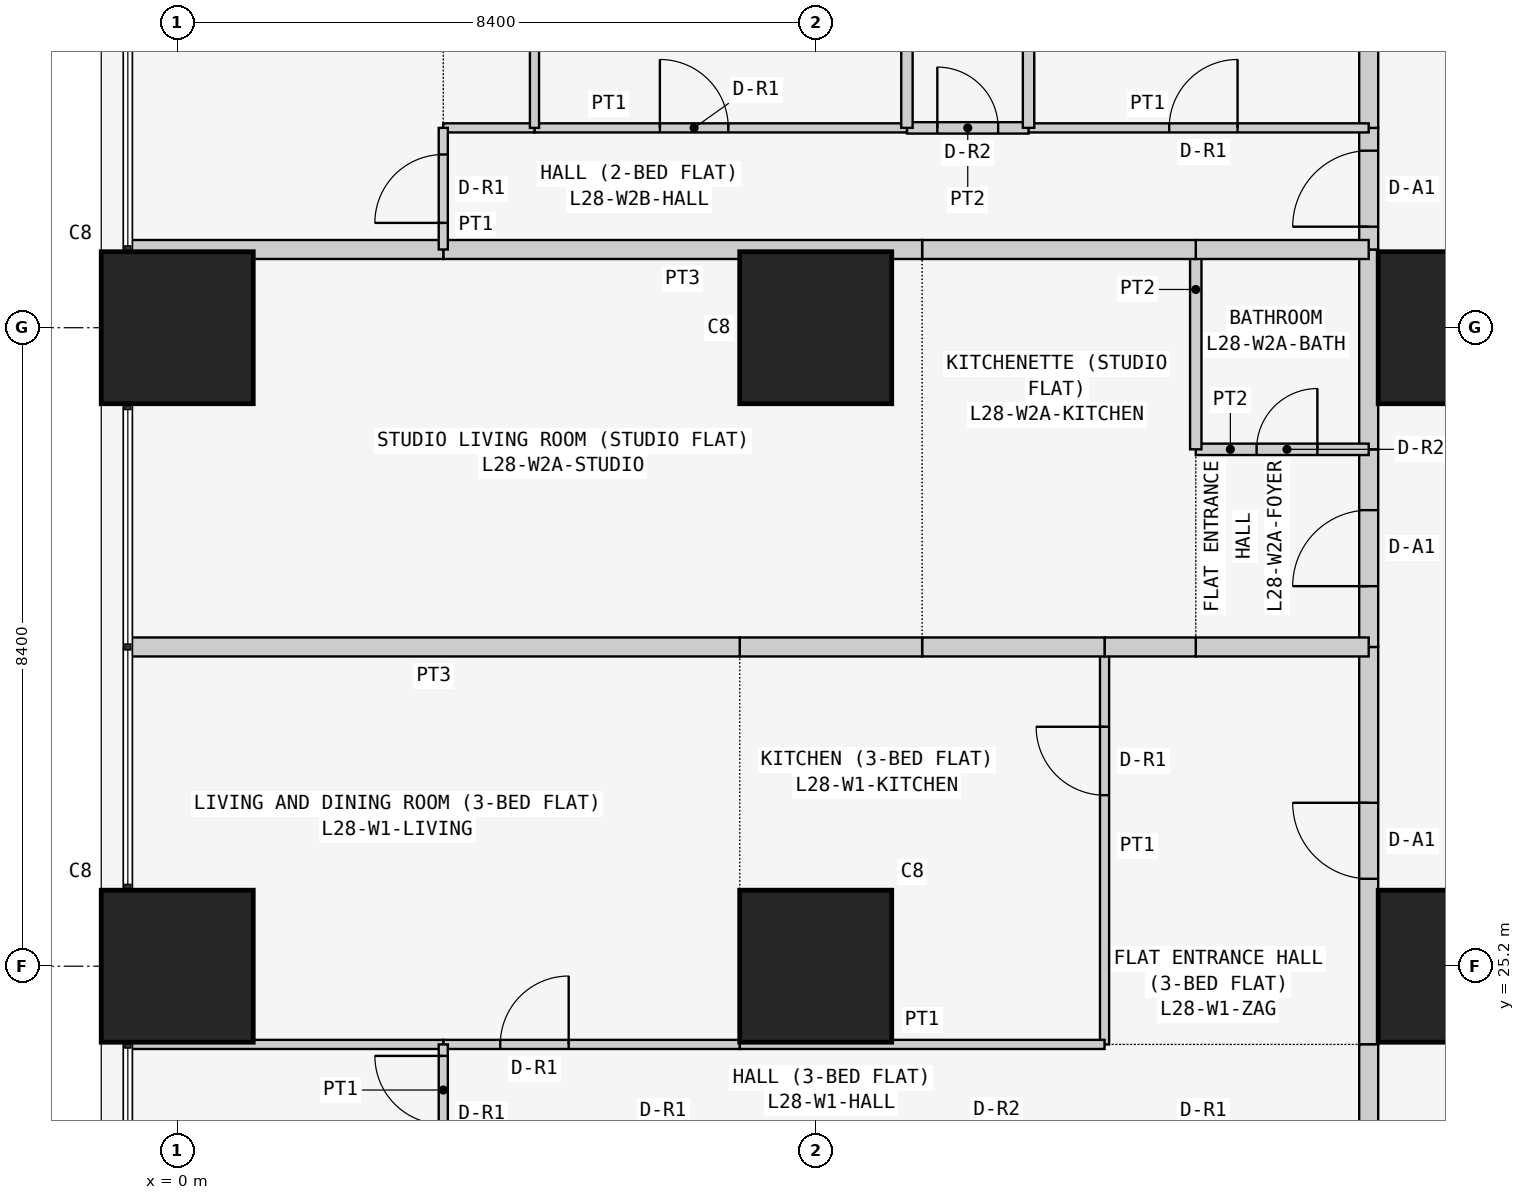
"""IFC4 building model, lengths in metres.
Left out: names, types, materials, properties, quantities, classifications, styles, units other than length and angle.
Written with IfcOpenShell. Run it as: python <this file> out.ifc"""

import sys

from ifc_helpers import new_model, si_unit, direction, frame, frame_2d, origin, origin_2d, place, context, subcontext, project, spatial, rectangle, extrude, element, fill, save


model = new_model("IFC4")
c1 = context("Model", 3, precision=1e-05, world=origin(), true_north=direction((0.0, 1.0)))
c2 = subcontext(c1, "Body", "Model", "MODEL_VIEW")
j1 = project(units=[si_unit("LENGTHUNIT", "METRE"), si_unit("PLANEANGLEUNIT", "RADIAN")], contexts=[c1])
p1 = place(None, origin())
s1 = spatial("IfcSite", under=j1, at=p1, CompositionType="ELEMENT")
p2 = place(p1, origin())
s2 = spatial("IfcBuilding", under=s1, at=p2, CompositionType="ELEMENT")
p3 = place(p2, frame((0.0, 0.0, 112.5)))
s3 = spatial("IfcBuildingStorey", under=s2, at=p3, CompositionType="ELEMENT", Elevation=112.5)
for number, where, z_axis, x_axis in (
    (1, (0.0, 25.2, 0.0), (0.0, 0.0, 1.0), (1.0, 0.0, 0.0)),
    (2, (0.0, 33.6, 0.0), (0.0, 0.0, 1.0), (1.0, 0.0, 0.0)),
    (3, (8.4, 25.2, 0.0), (0.0, 0.0, 1.0), (1.0, 0.0, 0.0)),
    (4, (8.4, 33.6, 0.0), (0.0, 0.0, 1.0), (1.0, 0.0, 0.0)),
    (5, (16.8, 25.2, 0.0), (0.0, 0.0, 1.0), (1.0, 0.0, 0.0)),
    (6, (16.8, 33.6, 0.0), (0.0, 0.0, 1.0), (1.0, 0.0, 0.0)),
):
    element("IfcColumn", number, at=place(p3, frame(where, z_axis=z_axis, x_axis=x_axis)), inside=s3, PredefinedType="COLUMN", context=c2, shape_type="SweptSolid", body=[
        extrude(rectangle(XDim=2.0, YDim=2.0, at=origin_2d()), origin(), (0.0, 0.0, 1.0), 3.6),
    ])
p4 = place(p3, frame((15.675, 24.171, 0.0), z_axis=(0.0, 0.0, 1.0), x_axis=(0.0, 1.0, 0.0)))
e7 = element("IfcWall", 7, at=p4, inside=s3, PredefinedType="PARTITIONING", context=c2, shape_type="SweptSolid", body=[
    extrude(rectangle(XDim=5.229, YDim=0.25, at=frame_2d((2.615, 0.0))), origin(), (0.0, 0.0, 1.0), 3.45),
])
p5 = place(p4, frame((2.179, 0.0, 0.0)))
e8 = element("IfcOpeningElement", 8, at=p5, cuts=e7, PredefinedType="OPENING", context=c2, shape_type="SweptSolid", body=[
    extrude(rectangle(XDim=1.0, YDim=2.1, at=frame_2d((0.5, 1.05))), frame((0.0, 0.135, 0.0), z_axis=(0.0, -1.0, 0.0), x_axis=(1.0, 0.0, 0.0)), (0.0, 0.0, 1.0), 0.27),
])
p6 = place(p3, frame((15.675, 22.971, 0.0), z_axis=(0.0, 0.0, 1.0), x_axis=(0.0, 1.0, 0.0)))
e9 = element("IfcWall", 9, at=p6, inside=s3, PredefinedType="PARTITIONING", context=c2, shape_type="SweptSolid", body=[
    extrude(rectangle(XDim=1.2, YDim=0.25, at=frame_2d((0.6, 0.0))), origin(), (0.0, 0.0, 1.0), 3.45),
])
p7 = place(p3, frame((15.675, 29.4, 0.0), z_axis=(0.0, 0.0, 1.0), x_axis=(0.0, 1.0, 0.0)))
e10 = element("IfcWall", 10, at=p7, inside=s3, PredefinedType="PARTITIONING", context=c2, shape_type="SweptSolid", body=[
    extrude(rectangle(XDim=2.6, YDim=0.25, at=frame_2d((1.3, 0.0))), origin(), (0.0, 0.0, 1.0), 3.45),
])
p8 = place(p7, frame((0.8, 0.0, 0.0)))
e11 = element("IfcOpeningElement", 11, at=p8, cuts=e10, PredefinedType="OPENING", context=c2, shape_type="SweptSolid", body=[
    extrude(rectangle(XDim=1.0, YDim=2.1, at=frame_2d((0.5, 1.05))), frame((0.0, 0.135, 0.0), z_axis=(0.0, -1.0, 0.0), x_axis=(1.0, 0.0, 0.0)), (0.0, 0.0, 1.0), 0.27),
])
p9 = place(p3, frame((15.675, 32.0, 0.0), z_axis=(0.0, 0.0, 1.0), x_axis=(0.0, 1.0, 0.0)))
e12 = element("IfcWall", 12, at=p9, inside=s3, PredefinedType="PARTITIONING", context=c2, shape_type="SweptSolid", body=[
    extrude(rectangle(XDim=2.629, YDim=0.25, at=frame_2d((1.314, 0.0))), origin(), (0.0, 0.0, 1.0), 3.45),
])
p10 = place(p3, frame((15.675, 34.629, 0.0), z_axis=(0.0, 0.0, 1.0), x_axis=(0.0, 1.0, 0.0)))
e13 = element("IfcWall", 13, at=p10, inside=s3, PredefinedType="PARTITIONING", context=c2, shape_type="SweptSolid", body=[
    extrude(rectangle(XDim=1.6, YDim=0.25, at=frame_2d((0.8, 0.0))), origin(), (0.0, 0.0, 1.0), 3.45),
])
p11 = place(p10, frame((0.3, 0.0, 0.0)))
e14 = element("IfcOpeningElement", 14, at=p11, cuts=e13, PredefinedType="OPENING", context=c2, shape_type="SweptSolid", body=[
    extrude(rectangle(XDim=1.0, YDim=2.1, at=frame_2d((0.5, 1.05))), frame((0.0, 0.135, 0.0), z_axis=(0.0, -1.0, 0.0), x_axis=(1.0, 0.0, 0.0)), (0.0, 0.0, 1.0), 0.27),
])
p12 = place(p3, frame((15.675, 36.229, 0.0), z_axis=(0.0, 0.0, 1.0), x_axis=(0.0, 1.0, 0.0)))
e15 = element("IfcWall", 15, at=p12, inside=s3, PredefinedType="PARTITIONING", context=c2, shape_type="SweptSolid", body=[
    extrude(rectangle(XDim=6.471, YDim=0.25, at=frame_2d((3.235, 0.0))), origin(), (0.0, 0.0, 1.0), 3.45),
])
p13 = place(p3, frame((12.2, 29.4, 0.0), z_axis=(0.0, 0.0, 1.0), x_axis=(0.0, -1.0, 0.0)))
e16 = element("IfcWall", 16, at=p13, inside=s3, PredefinedType="PARTITIONING", context=c2, shape_type="SweptSolid", body=[
    extrude(rectangle(XDim=5.229, YDim=0.12, at=frame_2d((2.615, 0.0))), origin(), (0.0, 0.0, 1.0), 3.45),
])
p14 = place(p13, frame((1.05, 0.0, 0.0)))
e17 = element("IfcOpeningElement", 17, at=p14, cuts=e16, PredefinedType="OPENING", context=c2, shape_type="SweptSolid", body=[
    extrude(rectangle(XDim=0.9, YDim=2.1, at=frame_2d((0.45, 1.05))), frame((0.0, 0.07, 0.0), z_axis=(0.0, -1.0, 0.0), x_axis=(1.0, 0.0, 0.0)), (0.0, 0.0, 1.0), 0.14),
])
p15 = place(p3, frame((15.675, 29.4, 0.0), z_axis=(0.0, 0.0, 1.0), x_axis=(-1.0, 0.0, 0.0)))
e18 = element("IfcWall", 18, at=p15, inside=s3, PredefinedType="PARTITIONING", context=c2, shape_type="SweptSolid", body=[
    extrude(rectangle(XDim=2.275, YDim=0.25, at=frame_2d((1.138, 0.0))), origin(), (0.0, 0.0, 1.0), 3.45),
])
p16 = place(p3, frame((13.4, 29.4, 0.0), z_axis=(0.0, 0.0, 1.0), x_axis=(-1.0, 0.0, 0.0)))
e19 = element("IfcWall", 19, at=p16, inside=s3, PredefinedType="PARTITIONING", context=c2, shape_type="SweptSolid", body=[
    extrude(rectangle(XDim=1.2, YDim=0.25, at=frame_2d((0.6, 0.0))), origin(), (0.0, 0.0, 1.0), 3.45),
])
p17 = place(p3, frame((7.4, 24.171, 0.0), z_axis=(0.0, 0.0, 1.0), x_axis=(1.0, 0.0, 0.0)))
e20 = element("IfcWall", 20, at=p17, inside=s3, PredefinedType="PARTITIONING", context=c2, shape_type="SweptSolid", body=[
    extrude(rectangle(XDim=4.8, YDim=0.12, at=frame_2d((2.4, 0.0))), origin(), (0.0, 0.0, 1.0), 3.45),
])
p18 = place(p3, frame((12.2, 29.4, 0.0), z_axis=(0.0, 0.0, 1.0), x_axis=(-1.0, 0.0, 0.0)))
e21 = element("IfcWall", 21, at=p18, inside=s3, PredefinedType="PARTITIONING", context=c2, shape_type="SweptSolid", body=[
    extrude(rectangle(XDim=2.4, YDim=0.25, at=frame_2d((1.2, 0.0))), origin(), (0.0, 0.0, 1.0), 3.45),
])
p19 = place(p3, frame((9.8, 29.4, 0.0), z_axis=(0.0, 0.0, 1.0), x_axis=(-1.0, 0.0, 0.0)))
e22 = element("IfcWall", 22, at=p19, inside=s3, PredefinedType="PARTITIONING", context=c2, shape_type="SweptSolid", body=[
    extrude(rectangle(XDim=2.4, YDim=0.25, at=frame_2d((1.2, 0.0))), origin(), (0.0, 0.0, 1.0), 3.45),
])
p20 = place(p3, frame((3.5, 24.171, 0.0), z_axis=(0.0, 0.0, 1.0), x_axis=(1.0, 0.0, 0.0)))
e23 = element("IfcWall", 23, at=p20, inside=s3, PredefinedType="PARTITIONING", context=c2, shape_type="SweptSolid", body=[
    extrude(rectangle(XDim=3.9, YDim=0.12, at=frame_2d((1.95, 0.0))), origin(), (0.0, 0.0, 1.0), 3.45),
])
p21 = place(p20, frame((0.75, 0.0, 0.0)))
e24 = element("IfcOpeningElement", 24, at=p21, cuts=e23, PredefinedType="OPENING", context=c2, shape_type="SweptSolid", body=[
    extrude(rectangle(XDim=0.9, YDim=2.1, at=frame_2d((0.45, 1.05))), frame((0.0, 0.07, 0.0), z_axis=(0.0, -1.0, 0.0), x_axis=(1.0, 0.0, 0.0)), (0.0, 0.0, 1.0), 0.14),
])
p22 = place(p3, frame((-0.65, 24.171, 0.0), z_axis=(0.0, 0.0, 1.0), x_axis=(1.0, 0.0, 0.0)))
e25 = element("IfcWall", 25, at=p22, inside=s3, PredefinedType="PARTITIONING", context=c2, shape_type="SweptSolid", body=[
    extrude(rectangle(XDim=4.15, YDim=0.12, at=frame_2d((2.075, 0.0))), origin(), (0.0, 0.0, 1.0), 3.45),
])
p23 = place(p3, frame((7.4, 29.4, 0.0), z_axis=(0.0, 0.0, 1.0), x_axis=(-1.0, 0.0, 0.0)))
e26 = element("IfcWall", 26, at=p23, inside=s3, PredefinedType="PARTITIONING", context=c2, shape_type="SweptSolid", body=[
    extrude(rectangle(XDim=8.05, YDim=0.25, at=frame_2d((4.025, 0.0))), origin(), (0.0, 0.0, 1.0), 3.45),
])
p24 = place(p3, frame((3.5, 24.171, 0.0), z_axis=(0.0, 0.0, 1.0), x_axis=(0.0, -1.0, 0.0)))
e27 = element("IfcWall", 27, at=p24, inside=s3, PredefinedType="PARTITIONING", context=c2, shape_type="SweptSolid", body=[
    extrude(rectangle(XDim=1.2, YDim=0.12, at=frame_2d((0.6, 0.0))), origin(), (0.0, 0.0, 1.0), 3.45),
])
p25 = place(p24, frame((0.151, 0.0, 0.0)))
e28 = element("IfcOpeningElement", 28, at=p25, cuts=e27, PredefinedType="OPENING", context=c2, shape_type="SweptSolid", body=[
    extrude(rectangle(XDim=0.9, YDim=2.1, at=frame_2d((0.45, 1.05))), frame((0.0, 0.07, 0.0), z_axis=(0.0, -1.0, 0.0), x_axis=(1.0, 0.0, 0.0)), (0.0, 0.0, 1.0), 0.14),
])
p26 = place(p3, frame((13.4, 32.0, 0.0), z_axis=(0.0, 0.0, 1.0), x_axis=(1.0, 0.0, 0.0)))
e29 = element("IfcWall", 29, at=p26, inside=s3, PredefinedType="PARTITIONING", context=c2, shape_type="SweptSolid", body=[
    extrude(rectangle(XDim=2.275, YDim=0.15, at=frame_2d((1.138, 0.0))), origin(), (0.0, 0.0, 1.0), 3.45),
])
p27 = place(p26, frame((0.8, 0.0, 0.0)))
e30 = element("IfcOpeningElement", 30, at=p27, cuts=e29, PredefinedType="OPENING", context=c2, shape_type="SweptSolid", body=[
    extrude(rectangle(XDim=0.8, YDim=2.1, at=frame_2d((0.4, 1.05))), frame((0.0, 0.085, 0.0), z_axis=(0.0, -1.0, 0.0), x_axis=(1.0, 0.0, 0.0)), (0.0, 0.0, 1.0), 0.17),
])
p28 = place(p3, frame((13.4, 32.0, 0.0), z_axis=(0.0, 0.0, 1.0), x_axis=(0.0, 1.0, 0.0)))
e31 = element("IfcWall", 31, at=p28, inside=s3, PredefinedType="PARTITIONING", context=c2, shape_type="SweptSolid", body=[
    extrude(rectangle(XDim=2.629, YDim=0.15, at=frame_2d((1.314, 0.0))), origin(), (0.0, 0.0, 1.0), 3.45),
])
p29 = place(p3, frame((13.4, 34.629, 0.0), z_axis=(0.0, 0.0, 1.0), x_axis=(1.0, 0.0, 0.0)))
e32 = element("IfcWall", 32, at=p29, inside=s3, PredefinedType="PARTITIONING", context=c2, shape_type="SweptSolid", body=[
    extrude(rectangle(XDim=2.275, YDim=0.25, at=frame_2d((1.138, 0.0))), origin(), (0.0, 0.0, 1.0), 3.45),
])
p30 = place(p3, frame((9.8, 34.629, 0.0), z_axis=(0.0, 0.0, 1.0), x_axis=(1.0, 0.0, 0.0)))
e33 = element("IfcWall", 33, at=p30, inside=s3, PredefinedType="PARTITIONING", context=c2, shape_type="SweptSolid", body=[
    extrude(rectangle(XDim=3.6, YDim=0.25, at=frame_2d((1.8, 0.0))), origin(), (0.0, 0.0, 1.0), 3.45),
])
p31 = place(p3, frame((3.5, 34.629, 0.0), z_axis=(0.0, 0.0, 1.0), x_axis=(1.0, 0.0, 0.0)))
e34 = element("IfcWall", 34, at=p31, inside=s3, PredefinedType="PARTITIONING", context=c2, shape_type="SweptSolid", body=[
    extrude(rectangle(XDim=6.3, YDim=0.25, at=frame_2d((3.15, 0.0))), origin(), (0.0, 0.0, 1.0), 3.45),
])
p32 = place(p3, frame((-0.65, 34.629, 0.0), z_axis=(0.0, 0.0, 1.0), x_axis=(1.0, 0.0, 0.0)))
e35 = element("IfcWall", 35, at=p32, inside=s3, PredefinedType="PARTITIONING", context=c2, shape_type="SweptSolid", body=[
    extrude(rectangle(XDim=4.15, YDim=0.25, at=frame_2d((2.075, 0.0))), origin(), (0.0, 0.0, 1.0), 3.45),
])
p33 = place(p3, frame((11.2, 36.229, 0.0), z_axis=(0.0, 0.0, 1.0), x_axis=(1.0, 0.0, 0.0)))
e36 = element("IfcWall", 36, at=p33, inside=s3, PredefinedType="PARTITIONING", context=c2, shape_type="SweptSolid", body=[
    extrude(rectangle(XDim=4.475, YDim=0.12, at=frame_2d((2.238, 0.0))), origin(), (0.0, 0.0, 1.0), 3.45),
])
p34 = place(p33, frame((1.85, 0.0, 0.0)))
e37 = element("IfcOpeningElement", 37, at=p34, cuts=e36, PredefinedType="OPENING", context=c2, shape_type="SweptSolid", body=[
    extrude(rectangle(XDim=0.9, YDim=2.1, at=frame_2d((0.45, 1.05))), frame((0.0, 0.07, 0.0), z_axis=(0.0, -1.0, 0.0), x_axis=(1.0, 0.0, 0.0)), (0.0, 0.0, 1.0), 0.14),
])
p35 = place(p3, frame((9.6, 36.229, 0.0), z_axis=(0.0, 0.0, 1.0), x_axis=(1.0, 0.0, 0.0)))
e38 = element("IfcWall", 38, at=p35, inside=s3, PredefinedType="PARTITIONING", context=c2, shape_type="SweptSolid", body=[
    extrude(rectangle(XDim=1.6, YDim=0.15, at=frame_2d((0.8, 0.0))), origin(), (0.0, 0.0, 1.0), 3.45),
])
p36 = place(p35, frame((0.4, 0.0, 0.0)))
e39 = element("IfcOpeningElement", 39, at=p36, cuts=e38, PredefinedType="OPENING", context=c2, shape_type="SweptSolid", body=[
    extrude(rectangle(XDim=0.8, YDim=2.1, at=frame_2d((0.4, 1.05))), frame((0.0, 0.085, 0.0), z_axis=(0.0, -1.0, 0.0), x_axis=(1.0, 0.0, 0.0)), (0.0, 0.0, 1.0), 0.17),
])
p37 = place(p3, frame((4.7, 36.229, 0.0), z_axis=(0.0, 0.0, 1.0), x_axis=(1.0, 0.0, 0.0)))
e40 = element("IfcWall", 40, at=p37, inside=s3, PredefinedType="PARTITIONING", context=c2, shape_type="SweptSolid", body=[
    extrude(rectangle(XDim=4.9, YDim=0.12, at=frame_2d((2.45, 0.0))), origin(), (0.0, 0.0, 1.0), 3.45),
])
p38 = place(p37, frame((1.65, 0.0, 0.0)))
e41 = element("IfcOpeningElement", 41, at=p38, cuts=e40, PredefinedType="OPENING", context=c2, shape_type="SweptSolid", body=[
    extrude(rectangle(XDim=0.9, YDim=2.1, at=frame_2d((0.45, 1.05))), frame((0.0, 0.07, 0.0), z_axis=(0.0, -1.0, 0.0), x_axis=(1.0, 0.0, 0.0)), (0.0, 0.0, 1.0), 0.14),
])
p39 = place(p3, frame((3.5, 36.229, 0.0), z_axis=(0.0, 0.0, 1.0), x_axis=(1.0, 0.0, 0.0)))
e42 = element("IfcWall", 42, at=p39, inside=s3, PredefinedType="PARTITIONING", context=c2, shape_type="SweptSolid", body=[
    extrude(rectangle(XDim=1.2, YDim=0.12, at=frame_2d((0.6, 0.0))), origin(), (0.0, 0.0, 1.0), 3.45),
])
p40 = place(p3, frame((3.5, 34.629, 0.0), z_axis=(0.0, 0.0, 1.0), x_axis=(0.0, 1.0, 0.0)))
e43 = element("IfcWall", 43, at=p40, inside=s3, PredefinedType="PARTITIONING", context=c2, shape_type="SweptSolid", body=[
    extrude(rectangle(XDim=1.6, YDim=0.12, at=frame_2d((0.8, 0.0))), origin(), (0.0, 0.0, 1.0), 3.45),
])
p41 = place(p40, frame((0.35, 0.0, 0.0)))
e44 = element("IfcOpeningElement", 44, at=p41, cuts=e43, PredefinedType="OPENING", context=c2, shape_type="SweptSolid", body=[
    extrude(rectangle(XDim=0.9, YDim=2.1, at=frame_2d((0.45, 1.05))), frame((0.0, 0.07, 0.0), z_axis=(0.0, -1.0, 0.0), x_axis=(1.0, 0.0, 0.0)), (0.0, 0.0, 1.0), 0.14),
])
for number, where, z_axis, x_axis in (
    (45, (11.2, 36.229, 0.0), (0.0, 0.0, 1.0), (0.0, 1.0, 0.0)),
    (46, (9.6, 36.229, 0.0), (0.0, 0.0, 1.0), (0.0, 1.0, 0.0)),
):
    element("IfcWall", number, at=place(p3, frame(where, z_axis=z_axis, x_axis=x_axis)), inside=s3, PredefinedType="PARTITIONING", context=c2, shape_type="SweptSolid", body=[
        extrude(rectangle(XDim=6.471, YDim=0.15, at=frame_2d((3.235, 0.0))), origin(), (0.0, 0.0, 1.0), 3.45),
    ])
p42 = place(p3, frame((4.7, 36.229, 0.0), z_axis=(0.0, 0.0, 1.0), x_axis=(0.0, 1.0, 0.0)))
e47 = element("IfcWall", 47, at=p42, inside=s3, PredefinedType="PARTITIONING", context=c2, shape_type="SweptSolid", body=[
    extrude(rectangle(XDim=6.471, YDim=0.12, at=frame_2d((3.235, 0.0))), origin(), (0.0, 0.0, 1.0), 3.45),
])
p43 = place(p5, origin())
e48 = element("IfcDoor", 48, at=p43, inside=s3, OperationType="SINGLE_SWING_RIGHT", PredefinedType="DOOR", context=c2, shape_type="SweptSolid", body=[
    extrude(rectangle(XDim=1.0, YDim=2.1, at=frame_2d((0.5, 1.05))), frame((0.0, 0.025, 0.0), z_axis=(0.0, -1.0, 0.0), x_axis=(1.0, 0.0, 0.0)), (0.0, 0.0, 1.0), 0.05),
])
fill(e8, e48)
p44 = place(p14, frame((0.9, 0.0, 0.0), z_axis=(0.0, 0.0, 1.0), x_axis=(-1.0, 0.0, 0.0)))
e49 = element("IfcDoor", 49, at=p44, inside=s3, OperationType="SINGLE_SWING_RIGHT", PredefinedType="DOOR", context=c2, shape_type="SweptSolid", body=[
    extrude(rectangle(XDim=0.9, YDim=2.1, at=frame_2d((0.45, 1.05))), frame((0.0, 0.025, 0.0), z_axis=(0.0, -1.0, 0.0), x_axis=(1.0, 0.0, 0.0)), (0.0, 0.0, 1.0), 0.05),
])
fill(e17, e49)
p45 = place(p21, origin())
e50 = element("IfcDoor", 50, at=p45, inside=s3, OperationType="SINGLE_SWING_RIGHT", PredefinedType="DOOR", context=c2, shape_type="SweptSolid", body=[
    extrude(rectangle(XDim=0.9, YDim=2.1, at=frame_2d((0.45, 1.05))), frame((0.0, 0.025, 0.0), z_axis=(0.0, -1.0, 0.0), x_axis=(1.0, 0.0, 0.0)), (0.0, 0.0, 1.0), 0.05),
])
fill(e24, e50)
p46 = place(p25, frame((0.9, 0.0, 0.0), z_axis=(0.0, 0.0, 1.0), x_axis=(-1.0, 0.0, 0.0)))
e51 = element("IfcDoor", 51, at=p46, inside=s3, OperationType="SINGLE_SWING_RIGHT", PredefinedType="DOOR", context=c2, shape_type="SweptSolid", body=[
    extrude(rectangle(XDim=0.9, YDim=2.1, at=frame_2d((0.45, 1.05))), frame((0.0, 0.025, 0.0), z_axis=(0.0, -1.0, 0.0), x_axis=(1.0, 0.0, 0.0)), (0.0, 0.0, 1.0), 0.05),
])
fill(e28, e51)
p47 = place(p8, origin())
e52 = element("IfcDoor", 52, at=p47, inside=s3, OperationType="SINGLE_SWING_LEFT", PredefinedType="DOOR", context=c2, shape_type="SweptSolid", body=[
    extrude(rectangle(XDim=1.0, YDim=2.1, at=frame_2d((0.5, 1.05))), frame((0.0, 0.025, 0.0), z_axis=(0.0, -1.0, 0.0), x_axis=(1.0, 0.0, 0.0)), (0.0, 0.0, 1.0), 0.05),
])
fill(e11, e52)
p48 = place(p27, origin())
e53 = element("IfcDoor", 53, at=p48, inside=s3, OperationType="SINGLE_SWING_RIGHT", PredefinedType="DOOR", context=c2, shape_type="SweptSolid", body=[
    extrude(rectangle(XDim=0.8, YDim=2.1, at=frame_2d((0.4, 1.05))), frame((0.0, 0.025, 0.0), z_axis=(0.0, -1.0, 0.0), x_axis=(1.0, 0.0, 0.0)), (0.0, 0.0, 1.0), 0.05),
])
fill(e30, e53)
p49 = place(p11, origin())
e54 = element("IfcDoor", 54, at=p49, inside=s3, OperationType="SINGLE_SWING_LEFT", PredefinedType="DOOR", context=c2, shape_type="SweptSolid", body=[
    extrude(rectangle(XDim=1.0, YDim=2.1, at=frame_2d((0.5, 1.05))), frame((0.0, 0.025, 0.0), z_axis=(0.0, -1.0, 0.0), x_axis=(1.0, 0.0, 0.0)), (0.0, 0.0, 1.0), 0.05),
])
fill(e14, e54)
p50 = place(p34, origin())
e55 = element("IfcDoor", 55, at=p50, inside=s3, OperationType="SINGLE_SWING_RIGHT", PredefinedType="DOOR", context=c2, shape_type="SweptSolid", body=[
    extrude(rectangle(XDim=0.9, YDim=2.1, at=frame_2d((0.45, 1.05))), frame((0.0, 0.025, 0.0), z_axis=(0.0, -1.0, 0.0), x_axis=(1.0, 0.0, 0.0)), (0.0, 0.0, 1.0), 0.05),
])
fill(e37, e55)
p51 = place(p36, origin())
e56 = element("IfcDoor", 56, at=p51, inside=s3, OperationType="SINGLE_SWING_LEFT", PredefinedType="DOOR", context=c2, shape_type="SweptSolid", body=[
    extrude(rectangle(XDim=0.8, YDim=2.1, at=frame_2d((0.4, 1.05))), frame((0.0, 0.025, 0.0), z_axis=(0.0, -1.0, 0.0), x_axis=(1.0, 0.0, 0.0)), (0.0, 0.0, 1.0), 0.05),
])
fill(e39, e56)
p52 = place(p38, origin())
e57 = element("IfcDoor", 57, at=p52, inside=s3, OperationType="SINGLE_SWING_LEFT", PredefinedType="DOOR", context=c2, shape_type="SweptSolid", body=[
    extrude(rectangle(XDim=0.9, YDim=2.1, at=frame_2d((0.45, 1.05))), frame((0.0, 0.025, 0.0), z_axis=(0.0, -1.0, 0.0), x_axis=(1.0, 0.0, 0.0)), (0.0, 0.0, 1.0), 0.05),
])
fill(e41, e57)
p53 = place(p41, origin())
e58 = element("IfcDoor", 58, at=p53, inside=s3, OperationType="SINGLE_SWING_LEFT", PredefinedType="DOOR", context=c2, shape_type="SweptSolid", body=[
    extrude(rectangle(XDim=0.9, YDim=2.1, at=frame_2d((0.45, 1.05))), frame((0.0, 0.025, 0.0), z_axis=(0.0, -1.0, 0.0), x_axis=(1.0, 0.0, 0.0)), (0.0, 0.0, 1.0), 0.05),
])
fill(e44, e58)
save(model, sys.argv[1])
